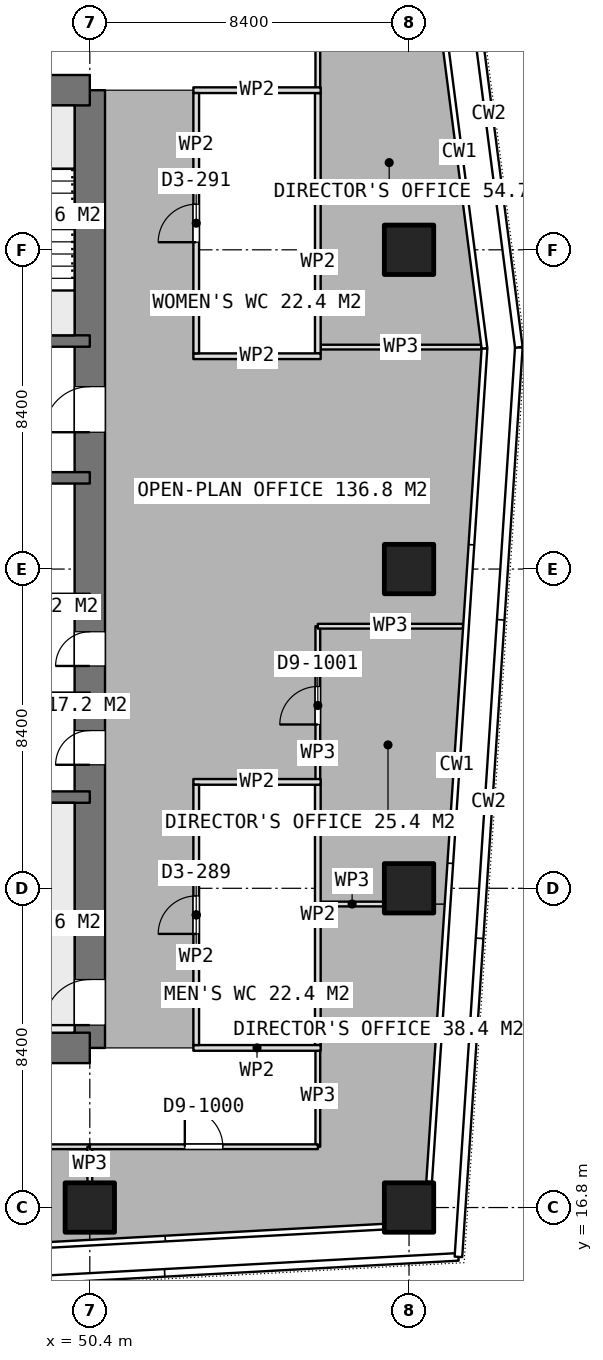
"""IFC4 building model, lengths in metres.
Left out: names, types, materials, properties, quantities, classifications, styles, units other than length and angle.
Written with IfcOpenShell. Run it as: python <this file> out.ifc"""

import sys

from ifc_helpers import new_model, si_unit, direction, frame, frame_2d, origin, origin_2d, place, context, subcontext, project, spatial, rectangle, extrude, element, fill, save


model = new_model("IFC4")
c1 = context("Model", 3, precision=1e-05, world=origin(), true_north=direction((0.0, 1.0)))
c2 = subcontext(c1, "Body", "Model", "MODEL_VIEW")
j1 = project(units=[si_unit("LENGTHUNIT", "METRE"), si_unit("PLANEANGLEUNIT", "RADIAN")], contexts=[c1])
p1 = place(None, origin())
s1 = spatial("IfcSite", under=j1, at=p1, CompositionType="ELEMENT")
p2 = place(p1, origin())
s2 = spatial("IfcBuilding", under=s1, at=p2, CompositionType="ELEMENT")
p3 = place(p2, frame((0.0, 0.0, 268.85)))
s3 = spatial("IfcBuildingStorey", under=s2, at=p3, CompositionType="ELEMENT", Elevation=268.85)
for number, where, z_axis, x_axis in (
    (1, (40.0, 21.0, 0.0), (0.0, 0.0, 1.0), (1.0, 0.0, 0.0)),
    (2, (40.0, 46.2, 0.0), (0.0, 0.0, 1.0), (1.0, 0.0, 0.0)),
):
    element("IfcWall", number, at=place(p3, frame(where, z_axis=z_axis, x_axis=x_axis)), inside=s3, PredefinedType="SHEAR", context=c2, shape_type="SweptSolid", body=[
        extrude(rectangle(XDim=10.4, YDim=0.8, at=frame_2d((5.2, 0.0))), origin(), (0.0, 0.0, 1.0), 3.75),
    ])
p4 = place(p3, frame((50.4, 21.0, 0.0), z_axis=(0.0, 0.0, 1.0), x_axis=(0.0, 1.0, 0.0)))
e3 = element("IfcWall", 3, at=p4, inside=s3, PredefinedType="SHEAR", context=c2, shape_type="SweptSolid", body=[
    extrude(rectangle(XDim=25.2, YDim=0.8, at=frame_2d((12.6, 0.0))), origin(), (0.0, 0.0, 1.0), 3.75),
])
p5 = place(p4, frame((16.2, 0.0, 0.0)))
e4 = element("IfcOpeningElement", 4, at=p5, cuts=e3, PredefinedType="OPENING", context=c2, shape_type="SweptSolid", body=[
    extrude(rectangle(XDim=1.2, YDim=2.1, at=frame_2d((0.6, 1.05))), frame((0.0, 0.41, 0.0), z_axis=(0.0, -1.0, 0.0), x_axis=(1.0, 0.0, 0.0)), (0.0, 0.0, 1.0), 0.82),
])
p6 = place(p4, frame((10.05, 0.0, 0.0)))
e5 = element("IfcOpeningElement", 5, at=p6, cuts=e3, PredefinedType="OPENING", context=c2, shape_type="SweptSolid", body=[
    extrude(rectangle(XDim=0.9, YDim=2.1, at=frame_2d((0.45, 1.05))), frame((0.0, 0.41, 0.0), z_axis=(0.0, -1.0, 0.0), x_axis=(1.0, 0.0, 0.0)), (0.0, 0.0, 1.0), 0.82),
])
p7 = place(p4, frame((7.45, 0.0, 0.0)))
e6 = element("IfcOpeningElement", 6, at=p7, cuts=e3, PredefinedType="OPENING", context=c2, shape_type="SweptSolid", body=[
    extrude(rectangle(XDim=0.9, YDim=2.1, at=frame_2d((0.45, 1.05))), frame((0.0, 0.41, 0.0), z_axis=(0.0, -1.0, 0.0), x_axis=(1.0, 0.0, 0.0)), (0.0, 0.0, 1.0), 0.82),
])
p8 = place(p4, frame((0.6, 0.0, 0.0)))
e7 = element("IfcOpeningElement", 7, at=p8, cuts=e3, PredefinedType="OPENING", context=c2, shape_type="SweptSolid", body=[
    extrude(rectangle(XDim=1.2, YDim=2.1, at=frame_2d((0.6, 1.05))), frame((0.0, 0.41, 0.0), z_axis=(0.0, -1.0, 0.0), x_axis=(1.0, 0.0, 0.0)), (0.0, 0.0, 1.0), 0.82),
])
for number, where, z_axis, x_axis in (
    (8, (43.8, 27.6, 0.0), (0.0, 0.0, 1.0), (1.0, 0.0, 0.0)),
    (9, (43.8, 30.2, 0.0), (0.0, 0.0, 1.0), (1.0, 0.0, 0.0)),
    (10, (43.8, 32.8, 0.0), (0.0, 0.0, 1.0), (1.0, 0.0, 0.0)),
):
    element("IfcWall", number, at=place(p3, frame(where, z_axis=z_axis, x_axis=x_axis)), inside=s3, PredefinedType="SHEAR", context=c2, shape_type="SweptSolid", body=[
        extrude(rectangle(XDim=6.6, YDim=0.3, at=frame_2d((3.3, 0.0))), origin(), (0.0, 0.0, 1.0), 3.75),
    ])
p9 = place(p3, frame((43.8, 36.0, 0.0), z_axis=(0.0, 0.0, 1.0), x_axis=(1.0, 0.0, 0.0)))
e11 = element("IfcWall", 11, at=p9, inside=s3, PredefinedType="SHEAR", context=c2, shape_type="SweptSolid", body=[
    extrude(rectangle(XDim=6.6, YDim=0.3, at=frame_2d((3.3, 0.0))), origin(), (0.0, 0.0, 1.0), 3.75),
])
p10 = place(p9, frame((2.65, 0.0, 0.0)))
e12 = element("IfcOpeningElement", 12, at=p10, cuts=e11, PredefinedType="OPENING", context=c2, shape_type="SweptSolid", body=[
    extrude(rectangle(XDim=1.3, YDim=2.1, at=frame_2d((0.65, 1.05))), frame((0.0, 0.16, 0.0), z_axis=(0.0, -1.0, 0.0), x_axis=(1.0, 0.0, 0.0)), (0.0, 0.0, 1.0), 0.32),
])
p11 = place(p3, frame((43.8, 39.6, 0.0), z_axis=(0.0, 0.0, 1.0), x_axis=(1.0, 0.0, 0.0)))
e13 = element("IfcWall", 13, at=p11, inside=s3, PredefinedType="SHEAR", context=c2, shape_type="SweptSolid", body=[
    extrude(rectangle(XDim=6.6, YDim=0.3, at=frame_2d((3.3, 0.0))), origin(), (0.0, 0.0, 1.0), 3.75),
])
p12 = place(p11, frame((0.35, 0.0, 0.0)))
e14 = element("IfcOpeningElement", 14, at=p12, cuts=e13, PredefinedType="OPENING", context=c2, shape_type="SweptSolid", body=[
    extrude(rectangle(XDim=1.2, YDim=2.1, at=frame_2d((0.6, 1.05))), frame((0.0, 0.16, 0.0), z_axis=(0.0, -1.0, 0.0), x_axis=(1.0, 0.0, 0.0)), (0.0, 0.0, 1.0), 0.32),
])
for number, where, z_axis, x_axis in (
    (15, (50.4, 16.8, 0.0), (0.0, 0.0, 1.0), (1.0, 0.0, 0.0)),
    (16, (58.8, 16.8, 0.0), (0.0, 0.0, 1.0), (1.0, 0.0, 0.0)),
    (17, (58.8, 25.2, 0.0), (0.0, 0.0, 1.0), (1.0, 0.0, 0.0)),
    (18, (58.8, 33.6, 0.0), (0.0, 0.0, 1.0), (1.0, 0.0, 0.0)),
    (19, (58.8, 42.0, 0.0), (0.0, 0.0, 1.0), (1.0, 0.0, 0.0)),
):
    element("IfcColumn", number, at=place(p3, frame(where, z_axis=z_axis, x_axis=x_axis)), inside=s3, PredefinedType="COLUMN", context=c2, shape_type="SweptSolid", body=[
        extrude(rectangle(XDim=1.3, YDim=1.3, at=origin_2d()), origin(), (0.0, 0.0, 1.0), 3.75),
    ])
for number, where, z_axis, x_axis in (
    (20, (53.125, 39.2, 0.0), (0.0, 0.0, 1.0), (1.0, 0.0, 0.0)),
    (21, (53.125, 46.2, 0.0), (0.0, 0.0, 1.0), (1.0, 0.0, 0.0)),
):
    element("IfcWall", number, at=place(p3, frame(where, z_axis=z_axis, x_axis=x_axis)), inside=s3, PredefinedType="PARTITIONING", context=c2, shape_type="SweptSolid", body=[
        extrude(rectangle(XDim=3.35, YDim=0.15, at=frame_2d((1.675, 0.0))), origin(), (0.0, 0.0, 1.0), 3.5),
    ])
p13 = place(p3, frame((53.2, 39.275, 0.0), z_axis=(0.0, 0.0, 1.0), x_axis=(0.0, 1.0, 0.0)))
e22 = element("IfcWall", 22, at=p13, inside=s3, PredefinedType="PARTITIONING", context=c2, shape_type="SweptSolid", body=[
    extrude(rectangle(XDim=6.85, YDim=0.15, at=frame_2d((3.425, 0.0))), origin(), (0.0, 0.0, 1.0), 3.5),
])
p14 = place(p13, frame((2.925, 0.0, 0.0)))
e23 = element("IfcOpeningElement", 23, at=p14, cuts=e22, PredefinedType="OPENING", context=c2, shape_type="SweptSolid", body=[
    extrude(rectangle(XDim=1.0, YDim=2.1, at=frame_2d((0.5, 1.05))), frame((0.0, 0.085, 0.0), z_axis=(0.0, -1.0, 0.0), x_axis=(1.0, 0.0, 0.0)), (0.0, 0.0, 1.0), 0.17),
])
p15 = place(p3, frame((56.4, 39.275, 0.0), z_axis=(0.0, 0.0, 1.0), x_axis=(0.0, 1.0, 0.0)))
e24 = element("IfcWall", 24, at=p15, inside=s3, PredefinedType="PARTITIONING", context=c2, shape_type="SweptSolid", body=[
    extrude(rectangle(XDim=6.85, YDim=0.15, at=frame_2d((3.425, 0.0))), origin(), (0.0, 0.0, 1.0), 3.5),
])
for number, where, z_axis, x_axis in (
    (25, (53.125, 21.0, 0.0), (0.0, 0.0, 1.0), (1.0, 0.0, 0.0)),
    (26, (53.125, 28.0, 0.0), (0.0, 0.0, 1.0), (1.0, 0.0, 0.0)),
):
    element("IfcWall", number, at=place(p3, frame(where, z_axis=z_axis, x_axis=x_axis)), inside=s3, PredefinedType="PARTITIONING", context=c2, shape_type="SweptSolid", body=[
        extrude(rectangle(XDim=3.35, YDim=0.15, at=frame_2d((1.675, 0.0))), origin(), (0.0, 0.0, 1.0), 3.5),
    ])
p16 = place(p3, frame((53.2, 21.075, 0.0), z_axis=(0.0, 0.0, 1.0), x_axis=(0.0, 1.0, 0.0)))
e27 = element("IfcWall", 27, at=p16, inside=s3, PredefinedType="PARTITIONING", context=c2, shape_type="SweptSolid", body=[
    extrude(rectangle(XDim=6.85, YDim=0.15, at=frame_2d((3.425, 0.0))), origin(), (0.0, 0.0, 1.0), 3.5),
])
p17 = place(p16, frame((2.925, 0.0, 0.0)))
e28 = element("IfcOpeningElement", 28, at=p17, cuts=e27, PredefinedType="OPENING", context=c2, shape_type="SweptSolid", body=[
    extrude(rectangle(XDim=1.0, YDim=2.1, at=frame_2d((0.5, 1.05))), frame((0.0, 0.085, 0.0), z_axis=(0.0, -1.0, 0.0), x_axis=(1.0, 0.0, 0.0)), (0.0, 0.0, 1.0), 0.17),
])
p18 = place(p3, frame((56.4, 21.075, 0.0), z_axis=(0.0, 0.0, 1.0), x_axis=(0.0, 1.0, 0.0)))
e29 = element("IfcWall", 29, at=p18, inside=s3, PredefinedType="PARTITIONING", context=c2, shape_type="SweptSolid", body=[
    extrude(rectangle(XDim=6.85, YDim=0.15, at=frame_2d((3.425, 0.0))), origin(), (0.0, 0.0, 1.0), 3.5),
])
p19 = place(p3, frame((42.674, 18.4, 0.0), z_axis=(0.0, 0.0, 1.0), x_axis=(1.0, 0.0, 0.0)))
e30 = element("IfcWall", 30, at=p19, inside=s3, PredefinedType="PARTITIONING", context=c2, shape_type="SweptSolid", body=[
    extrude(rectangle(XDim=7.726, YDim=0.125, at=frame_2d((3.863, 0.0))), origin(), (0.0, 0.0, 1.0), 3.5),
])
p20 = place(p19, frame((3.363, 0.0, 0.0)))
e31 = element("IfcOpeningElement", 31, at=p20, cuts=e30, PredefinedType="OPENING", context=c2, shape_type="SweptSolid", body=[
    extrude(rectangle(XDim=1.0, YDim=2.1, at=frame_2d((0.5, 1.05))), frame((0.0, 0.073, 0.0), z_axis=(0.0, -1.0, 0.0), x_axis=(1.0, 0.0, 0.0)), (0.0, 0.0, 1.0), 0.145),
])
p21 = place(p3, frame((50.4, 18.4, 0.0), z_axis=(0.0, 0.0, 1.0), x_axis=(0.0, -1.0, 0.0)))
e32 = element("IfcWall", 32, at=p21, inside=s3, PredefinedType="PARTITIONING", context=c2, shape_type="SweptSolid", body=[
    extrude(rectangle(XDim=0.93, YDim=0.125, at=frame_2d((0.465, 0.0))), origin(), (0.0, 0.0, 1.0), 3.5),
])
p22 = place(p3, frame((56.475, 24.786, 0.0), z_axis=(0.0, 0.0, 1.0), x_axis=(1.0, 0.0, 0.0)))
e33 = element("IfcWall", 33, at=p22, inside=s3, PredefinedType="PARTITIONING", context=c2, shape_type="SweptSolid", body=[
    extrude(rectangle(XDim=1.655, YDim=0.125, at=frame_2d((0.827, 0.0))), origin(), (0.0, 0.0, 1.0), 3.5),
])
p23 = place(p3, frame((50.401, 18.4, 0.0), z_axis=(0.0, 0.0, 1.0), x_axis=(1.0, 0.0, 0.0)))
e34 = element("IfcWall", 34, at=p23, inside=s3, PredefinedType="PARTITIONING", context=c2, shape_type="SweptSolid", body=[
    extrude(rectangle(XDim=5.999, YDim=0.125, at=frame_2d((3.0, 0.0))), origin(), (0.0, 0.0, 1.0), 3.5),
])
p24 = place(p23, frame((2.499, 0.0, 0.0)))
e35 = element("IfcOpeningElement", 35, at=p24, cuts=e34, PredefinedType="OPENING", context=c2, shape_type="SweptSolid", body=[
    extrude(rectangle(XDim=1.0, YDim=2.1, at=frame_2d((0.5, 1.05))), frame((0.0, 0.073, 0.0), z_axis=(0.0, -1.0, 0.0), x_axis=(1.0, 0.0, 0.0)), (0.0, 0.0, 1.0), 0.145),
])
p25 = place(p3, frame((56.4, 18.4, 0.0), z_axis=(0.0, 0.0, 1.0), x_axis=(0.0, 1.0, 0.0)))
e36 = element("IfcWall", 36, at=p25, inside=s3, PredefinedType="PARTITIONING", context=c2, shape_type="SweptSolid", body=[
    extrude(rectangle(XDim=2.675, YDim=0.125, at=frame_2d((1.337, 0.0))), origin(), (0.0, 0.0, 1.0), 3.5),
])
p26 = place(p3, frame((56.4, 27.925, 0.0), z_axis=(0.0, 0.0, 1.0), x_axis=(0.0, 1.0, 0.0)))
e37 = element("IfcWall", 37, at=p26, inside=s3, PredefinedType="PARTITIONING", context=c2, shape_type="SweptSolid", body=[
    extrude(rectangle(XDim=4.171, YDim=0.125, at=frame_2d((2.085, 0.0))), origin(), (0.0, 0.0, 1.0), 3.5),
])
p27 = place(p26, frame((1.585, 0.0, 0.0)))
e38 = element("IfcOpeningElement", 38, at=p27, cuts=e37, PredefinedType="OPENING", context=c2, shape_type="SweptSolid", body=[
    extrude(rectangle(XDim=1.0, YDim=2.1, at=frame_2d((0.5, 1.05))), frame((0.0, 0.073, 0.0), z_axis=(0.0, -1.0, 0.0), x_axis=(1.0, 0.0, 0.0)), (0.0, 0.0, 1.0), 0.145),
])
p28 = place(p3, frame((56.4, 32.096, 0.0), z_axis=(0.0, 0.0, 1.0), x_axis=(1.0, 0.0, 0.0)))
e39 = element("IfcWall", 39, at=p28, inside=s3, PredefinedType="PARTITIONING", context=c2, shape_type="SweptSolid", body=[
    extrude(rectangle(XDim=3.82, YDim=0.125, at=frame_2d((1.91, 0.0))), origin(), (0.0, 0.0, 1.0), 3.5),
])
p29 = place(p3, frame((60.7, 39.44, 0.0), z_axis=(0.0, 0.0, 1.0), x_axis=(-1.0, 0.0, 0.0)))
e40 = element("IfcWall", 40, at=p29, inside=s3, PredefinedType="PARTITIONING", context=c2, shape_type="SweptSolid", body=[
    extrude(rectangle(XDim=4.225, YDim=0.125, at=frame_2d((2.112, 0.0))), origin(), (0.0, 0.0, 1.0), 3.5),
])
p30 = place(p3, frame((56.4, 46.125, 0.0), z_axis=(0.0, 0.0, 1.0), x_axis=(0.0, 1.0, 0.0)))
e41 = element("IfcWall", 41, at=p30, inside=s3, PredefinedType="PARTITIONING", context=c2, shape_type="SweptSolid", body=[
    extrude(rectangle(XDim=3.025, YDim=0.125, at=frame_2d((1.512, 0.0))), origin(), (0.0, 0.0, 1.0), 3.5),
])
p31 = place(p5, origin())
e42 = element("IfcDoor", 42, at=p31, inside=s3, OperationType="SINGLE_SWING_LEFT", PredefinedType="DOOR", context=c2, shape_type="SweptSolid", body=[
    extrude(rectangle(XDim=1.2, YDim=2.1, at=frame_2d((0.6, 1.05))), frame((0.0, 0.025, 0.0), z_axis=(0.0, -1.0, 0.0), x_axis=(1.0, 0.0, 0.0)), (0.0, 0.0, 1.0), 0.05),
])
fill(e4, e42)
p32 = place(p6, origin())
e43 = element("IfcDoor", 43, at=p32, inside=s3, OperationType="SINGLE_SWING_LEFT", PredefinedType="DOOR", context=c2, shape_type="SweptSolid", body=[
    extrude(rectangle(XDim=0.9, YDim=2.1, at=frame_2d((0.45, 1.05))), frame((0.0, 0.025, 0.0), z_axis=(0.0, -1.0, 0.0), x_axis=(1.0, 0.0, 0.0)), (0.0, 0.0, 1.0), 0.05),
])
fill(e5, e43)
p33 = place(p7, origin())
e44 = element("IfcDoor", 44, at=p33, inside=s3, OperationType="SINGLE_SWING_LEFT", PredefinedType="DOOR", context=c2, shape_type="SweptSolid", body=[
    extrude(rectangle(XDim=0.9, YDim=2.1, at=frame_2d((0.45, 1.05))), frame((0.0, 0.025, 0.0), z_axis=(0.0, -1.0, 0.0), x_axis=(1.0, 0.0, 0.0)), (0.0, 0.0, 1.0), 0.05),
])
fill(e6, e44)
p34 = place(p14, origin())
e45 = element("IfcDoor", 45, at=p34, inside=s3, OperationType="SINGLE_SWING_LEFT", PredefinedType="DOOR", context=c2, shape_type="SweptSolid", body=[
    extrude(rectangle(XDim=1.0, YDim=2.1, at=frame_2d((0.5, 1.05))), frame((0.0, 0.025, 0.0), z_axis=(0.0, -1.0, 0.0), x_axis=(1.0, 0.0, 0.0)), (0.0, 0.0, 1.0), 0.05),
])
fill(e23, e45)
p35 = place(p17, origin())
e46 = element("IfcDoor", 46, at=p35, inside=s3, OperationType="SINGLE_SWING_LEFT", PredefinedType="DOOR", context=c2, shape_type="SweptSolid", body=[
    extrude(rectangle(XDim=1.0, YDim=2.1, at=frame_2d((0.5, 1.05))), frame((0.0, 0.025, 0.0), z_axis=(0.0, -1.0, 0.0), x_axis=(1.0, 0.0, 0.0)), (0.0, 0.0, 1.0), 0.05),
])
fill(e28, e46)
p36 = place(p24, origin())
e47 = element("IfcDoor", 47, at=p36, inside=s3, OperationType="SINGLE_SWING_LEFT", PredefinedType="DOOR", context=c2, shape_type="SweptSolid", body=[
    extrude(rectangle(XDim=1.0, YDim=2.1, at=frame_2d((0.5, 1.05))), frame((0.0, 0.025, 0.0), z_axis=(0.0, -1.0, 0.0), x_axis=(1.0, 0.0, 0.0)), (0.0, 0.0, 1.0), 0.05),
])
fill(e35, e47)
p37 = place(p27, origin())
e48 = element("IfcDoor", 48, at=p37, inside=s3, OperationType="SINGLE_SWING_LEFT", PredefinedType="DOOR", context=c2, shape_type="SweptSolid", body=[
    extrude(rectangle(XDim=1.0, YDim=2.1, at=frame_2d((0.5, 1.05))), frame((0.0, 0.025, 0.0), z_axis=(0.0, -1.0, 0.0), x_axis=(1.0, 0.0, 0.0)), (0.0, 0.0, 1.0), 0.05),
])
fill(e38, e48)
p38 = place(p8, origin())
e49 = element("IfcDoor", 49, at=p38, inside=s3, OperationType="SINGLE_SWING_RIGHT", PredefinedType="DOOR", context=c2, shape_type="SweptSolid", body=[
    extrude(rectangle(XDim=1.2, YDim=2.1, at=frame_2d((0.6, 1.05))), frame((0.0, 0.025, 0.0), z_axis=(0.0, -1.0, 0.0), x_axis=(1.0, 0.0, 0.0)), (0.0, 0.0, 1.0), 0.05),
])
fill(e7, e49)
save(model, sys.argv[1])
